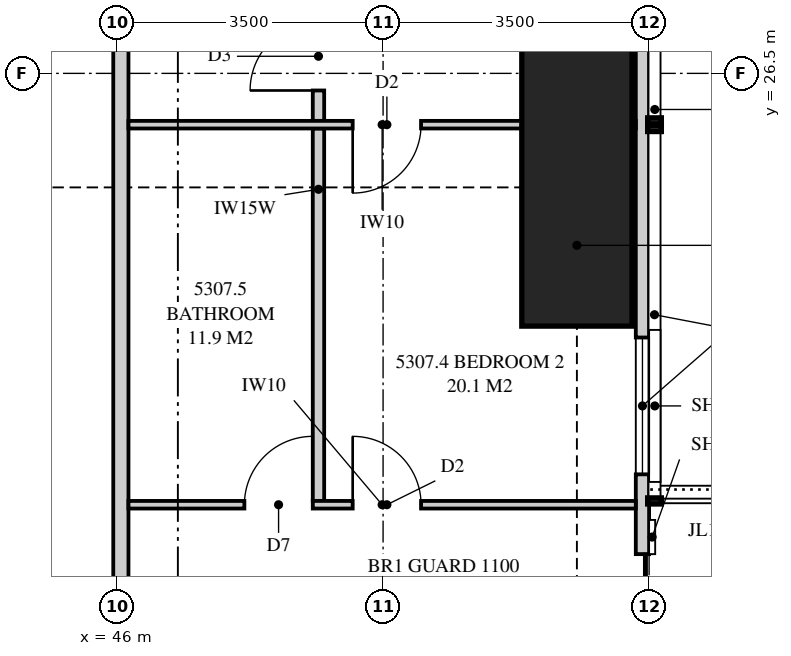
"""IFC4 building model, lengths in metres.
Left out: names, types, materials, properties, quantities, classifications, styles, units other than length and angle.
Written with IfcOpenShell. Run it as: python <this file> out.ifc"""

import sys

from ifc_helpers import new_model, si_unit, direction, frame, frame_2d, origin, origin_2d, place, context, subcontext, project, spatial, polyline, rectangle, outline, extrude, element, fill, save


model = new_model("IFC4")
c1 = context("Model", 3, precision=1e-05, world=origin(), true_north=direction((0.0, 1.0)))
c2 = subcontext(c1, "Body", "Model", "MODEL_VIEW")
j1 = project(units=[si_unit("LENGTHUNIT", "METRE"), si_unit("PLANEANGLEUNIT", "RADIAN")], contexts=[c1])
p1 = place(None, origin())
s1 = spatial("IfcSite", under=j1, at=p1, CompositionType="ELEMENT")
p2 = place(p1, origin())
s2 = spatial("IfcBuilding", under=s1, at=p2, CompositionType="ELEMENT")
p3 = place(p2, frame((0.0, 0.0, 194.55)))
s3 = spatial("IfcBuildingStorey", under=s2, at=p3, CompositionType="ELEMENT", Elevation=194.55)
p4 = place(p3, frame((52.05, 25.0, 0.0), z_axis=(0.0, 0.0, 1.0), x_axis=(1.0, 0.0, 0.0)))
e1 = element("IfcColumn", 1, at=p4, inside=s3, PredefinedType="COLUMN", context=c2, shape_type="SweptSolid", body=[
    extrude(rectangle(XDim=1.45, YDim=3.65, at=origin_2d()), origin(), (0.0, 0.0, 1.0), 3.35),
])
p5 = place(p3, frame((52.913, 3.051, 0.0), z_axis=(0.0, 0.0, 1.0), x_axis=(0.0, 1.0, 0.0)))
e2 = element("IfcWall", 2, at=p5, inside=s3, PredefinedType="SOLIDWALL", context=c2, shape_type="SweptSolid", body=[
    extrude(outline(polyline([(0.0, 0.0), (29.897, 0.0), (29.897, 3.11), (22.167, 3.11), (22.167, 2.15), (22.074, 2.15), (22.074, 3.11), (21.949, 3.11), (21.949, 2.15), (9.949, 2.15), (9.949, 3.11), (9.847, 3.11), (9.847, 2.15), (9.706, 2.15), (9.706, 3.11), (0.0, 3.11), (0.0, 0.0)])), frame((0.0, 0.087, 0.0), z_axis=(0.0, -1.0, 0.0), x_axis=(1.0, 0.0, 0.0)), (0.0, 0.0, 1.0), 0.175),
])
p6 = place(p5, frame((5.374, 0.0, 0.4)))
e3 = element("IfcOpeningElement", 3, at=p6, cuts=e2, PredefinedType="OPENING", context=c2, shape_type="SweptSolid", body=[
    extrude(rectangle(XDim=1.8, YDim=1.7, at=frame_2d((0.9, 0.85))), frame((0.0, 0.097, 0.0), z_axis=(0.0, -1.0, 0.0), x_axis=(1.0, 0.0, 0.0)), (0.0, 0.0, 1.0), 0.195),
])
p7 = place(p5, frame((12.199, 0.0, 0.4)))
e4 = element("IfcOpeningElement", 4, at=p7, cuts=e2, PredefinedType="OPENING", context=c2, shape_type="SweptSolid", body=[
    extrude(rectangle(XDim=1.8, YDim=1.7, at=frame_2d((0.9, 0.85))), frame((0.0, 0.097, 0.0), z_axis=(0.0, -1.0, 0.0), x_axis=(1.0, 0.0, 0.0)), (0.0, 0.0, 1.0), 0.195),
])
p8 = place(p5, frame((15.324, 0.0, 0.0)))
e5 = element("IfcOpeningElement", 5, at=p8, cuts=e2, PredefinedType="OPENING", context=c2, shape_type="SweptSolid", body=[
    extrude(rectangle(XDim=1.8, YDim=2.1, at=frame_2d((0.9, 1.05))), frame((0.0, 0.097, 0.0), z_axis=(0.0, -1.0, 0.0), x_axis=(1.0, 0.0, 0.0)), (0.0, 0.0, 1.0), 0.195),
])
p9 = place(p5, frame((18.174, 0.0, 0.4)))
e6 = element("IfcOpeningElement", 6, at=p9, cuts=e2, PredefinedType="OPENING", context=c2, shape_type="SweptSolid", body=[
    extrude(rectangle(XDim=1.8, YDim=1.7, at=frame_2d((0.9, 0.85))), frame((0.0, 0.097, 0.0), z_axis=(0.0, -1.0, 0.0), x_axis=(1.0, 0.0, 0.0)), (0.0, 0.0, 1.0), 0.195),
])
p10 = place(p5, frame((23.886, 0.0, 0.4)))
e7 = element("IfcOpeningElement", 7, at=p10, cuts=e2, PredefinedType="OPENING", context=c2, shape_type="SweptSolid", body=[
    extrude(rectangle(XDim=1.8, YDim=1.7, at=frame_2d((0.9, 0.85))), frame((0.0, 0.097, 0.0), z_axis=(0.0, -1.0, 0.0), x_axis=(1.0, 0.0, 0.0)), (0.0, 0.0, 1.0), 0.195),
])
p11 = place(p5, frame((26.871, 0.0, 0.4)))
e8 = element("IfcOpeningElement", 8, at=p11, cuts=e2, PredefinedType="OPENING", context=c2, shape_type="SweptSolid", body=[
    extrude(rectangle(XDim=1.8, YDim=1.7, at=frame_2d((0.9, 0.85))), frame((0.0, 0.097, 0.0), z_axis=(0.0, -1.0, 0.0), x_axis=(1.0, 0.0, 0.0)), (0.0, 0.0, 1.0), 0.195),
])
p12 = place(p3, frame((46.05, 7.925, 0.0), z_axis=(0.0, 0.0, 1.0), x_axis=(0.0, 1.0, 0.0)))
e9 = element("IfcWall", 9, at=p12, inside=s3, PredefinedType="PARTITIONING", context=c2, shape_type="SweptSolid", body=[
    extrude(outline(polyline([(0.0, 0.0), (21.15, 0.0), (21.15, 3.11), (17.412, 3.11), (17.412, 2.541), (16.738, 2.541), (16.738, 3.11), (5.412, 3.11), (5.412, 2.541), (4.738, 2.541), (4.738, 3.11), (0.0, 3.11), (0.0, 0.0)])), frame((0.0, 0.1, 0.0), z_axis=(0.0, -1.0, 0.0), x_axis=(1.0, 0.0, 0.0)), (0.0, 0.0, 1.0), 0.2),
])
p13 = place(p12, frame((10.075, 0.0, 0.0)))
e10 = element("IfcOpeningElement", 10, at=p13, cuts=e9, PredefinedType="OPENING", context=c2, shape_type="SweptSolid", body=[
    extrude(rectangle(XDim=1.05, YDim=2.2, at=frame_2d((0.525, 1.1))), frame((0.0, 0.11, 0.0), z_axis=(0.0, -1.0, 0.0), x_axis=(1.0, 0.0, 0.0)), (0.0, 0.0, 1.0), 0.22),
])
p14 = place(p3, frame((52.825, 20.825, 0.0), z_axis=(0.0, 0.0, 1.0), x_axis=(-1.0, 0.0, 0.0)))
e11 = element("IfcWall", 11, at=p14, inside=s3, PredefinedType="PARTITIONING", context=c2, shape_type="SweptSolid", body=[
    extrude(outline(polyline([(0.0, 0.0), (6.675, 0.0), (6.675, 3.11), (1.635, 3.11), (1.635, 2.15), (0.0, 2.15), (0.0, 3.11), (0.0, 0.0)])), frame((0.0, 0.05, 0.0), z_axis=(0.0, -1.0, 0.0), x_axis=(1.0, 0.0, 0.0)), (0.0, 0.0, 1.0), 0.1),
])
p15 = place(p14, frame((2.825, 0.0, 0.0)))
e12 = element("IfcOpeningElement", 12, at=p15, cuts=e11, PredefinedType="OPENING", context=c2, shape_type="SweptSolid", body=[
    extrude(rectangle(XDim=0.9, YDim=2.1, at=frame_2d((0.45, 1.05))), frame((0.0, 0.06, 0.0), z_axis=(0.0, -1.0, 0.0), x_axis=(1.0, 0.0, 0.0)), (0.0, 0.0, 1.0), 0.12),
])
p16 = place(p14, frame((4.25, 0.0, 0.0)))
e13 = element("IfcOpeningElement", 13, at=p16, cuts=e11, PredefinedType="OPENING", context=c2, shape_type="SweptSolid", body=[
    extrude(rectangle(XDim=0.9, YDim=2.1, at=frame_2d((0.45, 1.05))), frame((0.0, 0.06, 0.0), z_axis=(0.0, -1.0, 0.0), x_axis=(1.0, 0.0, 0.0)), (0.0, 0.0, 1.0), 0.12),
])
p17 = place(p3, frame((52.825, 25.825, 0.0), z_axis=(0.0, 0.0, 1.0), x_axis=(-1.0, 0.0, 0.0)))
e14 = element("IfcWall", 14, at=p17, inside=s3, PredefinedType="PARTITIONING", context=c2, shape_type="SweptSolid", body=[
    extrude(outline(polyline([(0.037, 3.11), (0.0, 3.11), (0.0, 0.0), (0.529, 0.0), (0.529, 0.664), (1.021, 0.664), (1.021, 0.0), (6.675, 0.0), (6.675, 3.11), (1.78, 3.11), (1.78, 2.15), (1.021, 2.15), (1.021, 1.486), (0.529, 1.486), (0.529, 2.15), (0.037, 2.15), (0.037, 3.11)])), frame((0.0, 0.05, 0.0), z_axis=(0.0, -1.0, 0.0), x_axis=(1.0, 0.0, 0.0)), (0.0, 0.0, 1.0), 0.1),
])
p18 = place(p17, frame((2.825, 0.0, 0.0)))
e15 = element("IfcOpeningElement", 15, at=p18, cuts=e14, PredefinedType="OPENING", context=c2, shape_type="SweptSolid", body=[
    extrude(rectangle(XDim=0.9, YDim=2.1, at=frame_2d((0.45, 1.05))), frame((0.0, 0.06, 0.0), z_axis=(0.0, -1.0, 0.0), x_axis=(1.0, 0.0, 0.0)), (0.0, 0.0, 1.0), 0.12),
])
p19 = place(p3, frame((48.65, 20.875, 0.0), z_axis=(0.0, 0.0, 1.0), x_axis=(0.0, 1.0, 0.0)))
e16 = element("IfcWall", 16, at=p19, inside=s3, PredefinedType="PLUMBINGWALL", context=c2, shape_type="SweptSolid", body=[
    extrude(outline(polyline([(0.0, 0.0), (4.9, 0.0), (4.9, 3.11), (4.438, 3.11), (4.438, 2.541), (3.812, 2.541), (3.812, 3.11), (0.0, 3.11), (0.0, 0.0)])), frame((0.0, 0.075, 0.0), z_axis=(0.0, -1.0, 0.0), x_axis=(1.0, 0.0, 0.0)), (0.0, 0.0, 1.0), 0.15),
])
p20 = place(p3, frame((48.65, 25.875, 0.0), z_axis=(0.0, 0.0, 1.0), x_axis=(0.0, 1.0, 0.0)))
e17 = element("IfcWall", 17, at=p20, inside=s3, PredefinedType="PLUMBINGWALL", context=c2, shape_type="SweptSolid", body=[
    extrude(rectangle(XDim=3.2, YDim=0.15, at=frame_2d((1.6, 0.0))), origin(), (0.0, 0.0, 1.0), 3.11),
])
p21 = place(p20, frame((0.4, 0.0, 0.0)))
e18 = element("IfcOpeningElement", 18, at=p21, cuts=e17, PredefinedType="OPENING", context=c2, shape_type="SweptSolid", body=[
    extrude(rectangle(XDim=0.9, YDim=2.1, at=frame_2d((0.45, 1.05))), frame((0.0, 0.085, 0.0), z_axis=(0.0, -1.0, 0.0), x_axis=(1.0, 0.0, 0.0)), (0.0, 0.0, 1.0), 0.17),
])
p22 = place(p8, origin())
e19 = element("IfcDoor", 19, at=p22, inside=s3, OperationType="SLIDING_TO_LEFT", PredefinedType="DOOR", context=c2, shape_type="SweptSolid", body=[
    extrude(rectangle(XDim=1.8, YDim=2.1, at=frame_2d((0.9, 1.05))), frame((0.0, 0.025, 0.0), z_axis=(0.0, -1.0, 0.0), x_axis=(1.0, 0.0, 0.0)), (0.0, 0.0, 1.0), 0.05),
])
fill(e5, e19)
p23 = place(p9, origin())
e20 = element("IfcWindow", 20, at=p23, inside=s3, PartitioningType="SINGLE_PANEL", PredefinedType="WINDOW", context=c2, shape_type="SweptSolid", body=[
    extrude(rectangle(XDim=1.8, YDim=1.7, at=frame_2d((0.9, 0.85))), frame((0.0, 0.03, 0.0), z_axis=(0.0, -1.0, 0.0), x_axis=(1.0, 0.0, 0.0)), (0.0, 0.0, 1.0), 0.06),
])
fill(e6, e20)
p24 = place(p15, frame((0.9, 0.0, 0.0), z_axis=(0.0, 0.0, 1.0), x_axis=(-1.0, 0.0, 0.0)))
e21 = element("IfcDoor", 21, at=p24, inside=s3, OperationType="SINGLE_SWING_LEFT", PredefinedType="DOOR", context=c2, shape_type="SweptSolid", body=[
    extrude(rectangle(XDim=0.9, YDim=2.1, at=frame_2d((0.45, 1.05))), frame((0.0, 0.025, 0.0), z_axis=(0.0, -1.0, 0.0), x_axis=(1.0, 0.0, 0.0)), (0.0, 0.0, 1.0), 0.05),
])
fill(e12, e21)
p25 = place(p16, frame((0.9, 0.0, 0.0), z_axis=(0.0, 0.0, 1.0), x_axis=(-1.0, 0.0, 0.0)))
e22 = element("IfcDoor", 22, at=p25, inside=s3, OperationType="SINGLE_SWING_RIGHT", PredefinedType="DOOR", context=c2, shape_type="SweptSolid", body=[
    extrude(rectangle(XDim=0.9, YDim=2.1, at=frame_2d((0.45, 1.05))), frame((0.0, 0.025, 0.0), z_axis=(0.0, -1.0, 0.0), x_axis=(1.0, 0.0, 0.0)), (0.0, 0.0, 1.0), 0.05),
])
fill(e13, e22)
p26 = place(p18, origin())
e23 = element("IfcDoor", 23, at=p26, inside=s3, OperationType="SINGLE_SWING_RIGHT", PredefinedType="DOOR", context=c2, shape_type="SweptSolid", body=[
    extrude(rectangle(XDim=0.9, YDim=2.1, at=frame_2d((0.45, 1.05))), frame((0.0, 0.025, 0.0), z_axis=(0.0, -1.0, 0.0), x_axis=(1.0, 0.0, 0.0)), (0.0, 0.0, 1.0), 0.05),
])
fill(e15, e23)
p27 = place(p21, origin())
e24 = element("IfcDoor", 24, at=p27, inside=s3, OperationType="SINGLE_SWING_LEFT", PredefinedType="DOOR", context=c2, shape_type="SweptSolid", body=[
    extrude(rectangle(XDim=0.9, YDim=2.1, at=frame_2d((0.45, 1.05))), frame((0.0, 0.025, 0.0), z_axis=(0.0, -1.0, 0.0), x_axis=(1.0, 0.0, 0.0)), (0.0, 0.0, 1.0), 0.05),
])
fill(e18, e24)
save(model, sys.argv[1])
